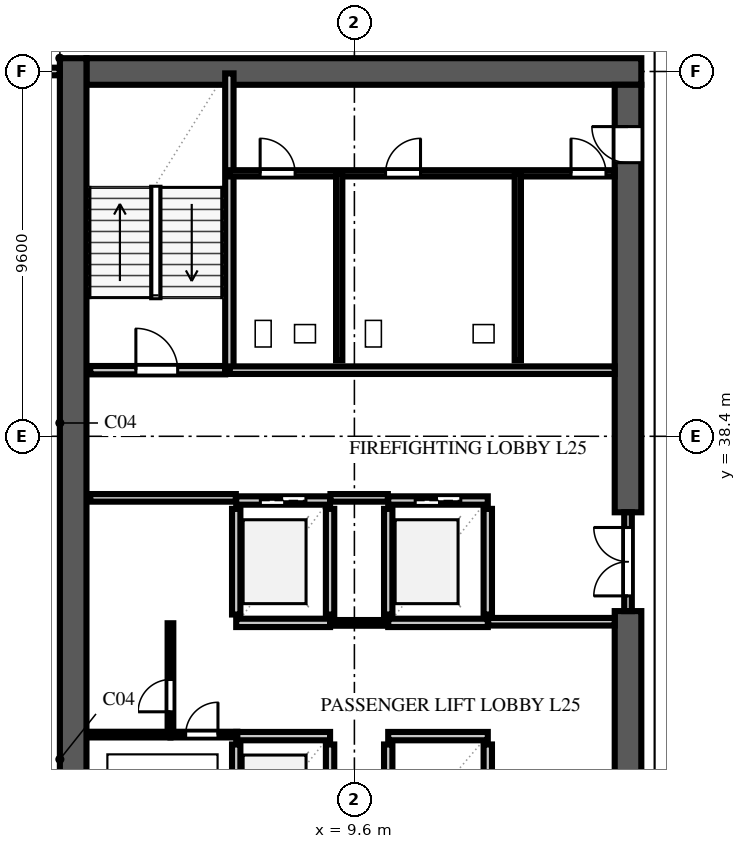
"""IFC4 building model, lengths in metres.
Left out: names, types, materials, properties, quantities, classifications, styles, units other than length and angle.
Written with IfcOpenShell. Run it as: python <this file> out.ifc"""

import sys

from ifc_helpers import new_model, si_unit, direction, frame, frame_2d, origin, place, context, subcontext, project, spatial, rectangle, extrude, element, fill, save


model = new_model("IFC4")
c1 = context("Model", 3, precision=1e-05, world=origin(), true_north=direction((0.0, 1.0)))
c2 = subcontext(c1, "Body", "Model", "MODEL_VIEW")
j1 = project(units=[si_unit("LENGTHUNIT", "METRE"), si_unit("PLANEANGLEUNIT", "RADIAN")], contexts=[c1])
p1 = place(None, origin())
s1 = spatial("IfcSite", under=j1, at=p1, CompositionType="ELEMENT")
p2 = place(p1, origin())
s2 = spatial("IfcBuilding", under=s1, at=p2, CompositionType="ELEMENT")
p3 = place(p2, frame((0.0, 0.0, 101.4)))
s3 = spatial("IfcBuildingStorey", under=s2, at=p3, CompositionType="ELEMENT", Elevation=101.4)
p4 = place(p3, frame((2.55, 48.0, 0.0), z_axis=(0.0, 0.0, 1.0), x_axis=(1.0, 0.0, 0.0)))
e1 = element("IfcWall", 1, at=p4, inside=s3, PredefinedType="SHEAR", context=c2, shape_type="SweptSolid", body=[
    extrude(rectangle(XDim=14.6, YDim=0.7, at=frame_2d((7.3, 0.0))), origin(), (0.0, 0.0, 1.0), 3.54),
])
p5 = place(p3, frame((2.2, 9.25, 0.0), z_axis=(0.0, 0.0, 1.0), x_axis=(0.0, 1.0, 0.0)))
e2 = element("IfcWall", 2, at=p5, inside=s3, PredefinedType="SHEAR", context=c2, shape_type="SweptSolid", body=[
    extrude(rectangle(XDim=39.1, YDim=0.7, at=frame_2d((19.55, 0.0))), origin(), (0.0, 0.0, 1.0), 3.54),
])
p6 = place(p3, frame((16.8, 26.0, 0.0), z_axis=(0.0, 0.0, 1.0), x_axis=(0.0, 1.0, 0.0)))
e3 = element("IfcWall", 3, at=p6, inside=s3, PredefinedType="SHEAR", context=c2, shape_type="SweptSolid", body=[
    extrude(rectangle(XDim=7.8, YDim=0.7, at=frame_2d((3.9, 0.0))), origin(), (0.0, 0.0, 1.0), 3.54),
])
p7 = place(p3, frame((16.8, 36.4, 0.0), z_axis=(0.0, 0.0, 1.0), x_axis=(0.0, 1.0, 0.0)))
e4 = element("IfcWall", 4, at=p7, inside=s3, PredefinedType="SHEAR", context=c2, shape_type="SweptSolid", body=[
    extrude(rectangle(XDim=11.25, YDim=0.7, at=frame_2d((5.625, 0.0))), origin(), (0.0, 0.0, 1.0), 3.54),
])
p8 = place(p7, frame((9.2, 0.0, 0.0)))
e5 = element("IfcOpeningElement", 5, at=p8, cuts=e4, PredefinedType="OPENING", context=c2, shape_type="SweptSolid", body=[
    extrude(rectangle(XDim=0.95, YDim=2.15, at=frame_2d((0.475, 1.075))), frame((0.0, 0.362, 0.0), z_axis=(0.0, -1.0, 0.0), x_axis=(1.0, 0.0, 0.0)), (0.0, 0.0, 1.0), 0.724),
])
p9 = place(p3, frame((2.65, 40.14, 0.0), z_axis=(0.0, 0.0, 1.0), x_axis=(1.0, 0.0, 0.0)))
e6 = element("IfcWall", 6, at=p9, inside=s3, PredefinedType="SOLIDWALL", context=c2, shape_type="SweptSolid", body=[
    extrude(rectangle(XDim=3.55, YDim=0.22, at=frame_2d((1.775, 0.0))), origin(), (0.0, 0.0, 1.0), 3.54),
])
p10 = place(p9, frame((1.2, 0.0, 0.0)))
e7 = element("IfcOpeningElement", 7, at=p10, cuts=e6, PredefinedType="OPENING", context=c2, shape_type="SweptSolid", body=[
    extrude(rectangle(XDim=1.1, YDim=2.2, at=frame_2d((0.55, 1.1))), frame((0.0, 0.122, 0.0), z_axis=(0.0, -1.0, 0.0), x_axis=(1.0, 0.0, 0.0)), (0.0, 0.0, 1.0), 0.244),
])
p11 = place(p3, frame((6.31, 40.14, 0.0), z_axis=(0.0, 0.0, 1.0), x_axis=(0.0, 1.0, 0.0)))
e8 = element("IfcWall", 8, at=p11, inside=s3, PredefinedType="SOLIDWALL", context=c2, shape_type="SweptSolid", body=[
    extrude(rectangle(XDim=7.81, YDim=0.22, at=frame_2d((3.905, 0.0))), origin(), (0.0, 0.0, 1.0), 3.54),
])
p12 = place(p3, frame((6.49, 27.71, 0.0), z_axis=(0.0, 0.0, 1.0), x_axis=(0.0, 1.0, 0.0)))
e9 = element("IfcWall", 9, at=p12, inside=s3, PredefinedType="SOLIDWALL", context=c2, shape_type="SweptSolid", body=[
    extrude(rectangle(XDim=2.58, YDim=0.22, at=frame_2d((1.29, 0.0))), origin(), (0.0, 0.0, 1.0), 3.54),
])
p13 = place(p3, frame((8.96, 27.71, 0.0), z_axis=(0.0, 0.0, 1.0), x_axis=(0.0, 1.0, 0.0)))
e10 = element("IfcWall", 10, at=p13, inside=s3, PredefinedType="SOLIDWALL", context=c2, shape_type="SweptSolid", body=[
    extrude(rectangle(XDim=2.58, YDim=0.22, at=frame_2d((1.29, 0.0))), origin(), (0.0, 0.0, 1.0), 3.54),
])
p14 = place(p13, frame((0.74, 0.0, 0.0)))
e11 = element("IfcOpeningElement", 11, at=p14, cuts=e10, PredefinedType="OPENING", context=c2, shape_type="SweptSolid", body=[
    extrude(rectangle(XDim=1.1, YDim=2.2, at=frame_2d((0.55, 1.1))), frame((0.0, 0.122, 0.0), z_axis=(0.0, -1.0, 0.0), x_axis=(1.0, 0.0, 0.0)), (0.0, 0.0, 1.0), 0.244),
])
p15 = place(p3, frame((6.49, 30.51, 0.0), z_axis=(0.0, 0.0, 1.0), x_axis=(1.0, 0.0, 0.0)))
e12 = element("IfcWall", 12, at=p15, inside=s3, PredefinedType="SOLIDWALL", context=c2, shape_type="SweptSolid", body=[
    extrude(rectangle(XDim=2.47, YDim=0.22, at=frame_2d((1.235, 0.0))), origin(), (0.0, 0.0, 1.0), 3.54),
])
for number, where, z_axis, x_axis in (
    (13, (10.49, 27.71, 0.0), (0.0, 0.0, 1.0), (0.0, 1.0, 0.0)),
    (14, (13.11, 27.71, 0.0), (0.0, 0.0, 1.0), (0.0, 1.0, 0.0)),
):
    element("IfcWall", number, at=place(p3, frame(where, z_axis=z_axis, x_axis=x_axis)), inside=s3, PredefinedType="SOLIDWALL", context=c2, shape_type="SweptSolid", body=[
        extrude(rectangle(XDim=2.58, YDim=0.22, at=frame_2d((1.29, 0.0))), origin(), (0.0, 0.0, 1.0), 3.54),
    ])
p16 = place(p3, frame((10.49, 30.51, 0.0), z_axis=(0.0, 0.0, 1.0), x_axis=(1.0, 0.0, 0.0)))
e15 = element("IfcWall", 15, at=p16, inside=s3, PredefinedType="SOLIDWALL", context=c2, shape_type="SweptSolid", body=[
    extrude(rectangle(XDim=2.62, YDim=0.22, at=frame_2d((1.31, 0.0))), origin(), (0.0, 0.0, 1.0), 3.54),
])
for number, where, z_axis, x_axis in (
    (16, (6.49, 33.71, 0.0), (0.0, 0.0, 1.0), (0.0, 1.0, 0.0)),
    (17, (8.96, 33.71, 0.0), (0.0, 0.0, 1.0), (0.0, 1.0, 0.0)),
):
    element("IfcWall", number, at=place(p3, frame(where, z_axis=z_axis, x_axis=x_axis)), inside=s3, PredefinedType="SOLIDWALL", context=c2, shape_type="SweptSolid", body=[
        extrude(rectangle(XDim=2.78, YDim=0.22, at=frame_2d((1.39, 0.0))), origin(), (0.0, 0.0, 1.0), 3.54),
    ])
p17 = place(p3, frame((6.49, 33.49, 0.0), z_axis=(0.0, 0.0, 1.0), x_axis=(1.0, 0.0, 0.0)))
e18 = element("IfcWall", 18, at=p17, inside=s3, PredefinedType="SOLIDWALL", context=c2, shape_type="SweptSolid", body=[
    extrude(rectangle(XDim=2.47, YDim=0.22, at=frame_2d((1.235, 0.0))), origin(), (0.0, 0.0, 1.0), 3.54),
])
p18 = place(p3, frame((6.49, 36.71, 0.0), z_axis=(0.0, 0.0, 1.0), x_axis=(1.0, 0.0, 0.0)))
e19 = element("IfcWall", 19, at=p18, inside=s3, PredefinedType="SOLIDWALL", context=c2, shape_type="SweptSolid", body=[
    extrude(rectangle(XDim=2.47, YDim=0.22, at=frame_2d((1.235, 0.0))), origin(), (0.0, 0.0, 1.0), 3.54),
])
p19 = place(p18, frame((0.635, 0.0, 0.0)))
e20 = element("IfcOpeningElement", 20, at=p19, cuts=e19, PredefinedType="OPENING", context=c2, shape_type="SweptSolid", body=[
    extrude(rectangle(XDim=1.2, YDim=2.2, at=frame_2d((0.6, 1.1))), frame((0.0, 0.122, 0.0), z_axis=(0.0, -1.0, 0.0), x_axis=(1.0, 0.0, 0.0)), (0.0, 0.0, 1.0), 0.244),
])
for number, where, z_axis, x_axis in (
    (21, (10.49, 33.71, 0.0), (0.0, 0.0, 1.0), (0.0, 1.0, 0.0)),
    (22, (13.11, 33.71, 0.0), (0.0, 0.0, 1.0), (0.0, 1.0, 0.0)),
):
    element("IfcWall", number, at=place(p3, frame(where, z_axis=z_axis, x_axis=x_axis)), inside=s3, PredefinedType="SOLIDWALL", context=c2, shape_type="SweptSolid", body=[
        extrude(rectangle(XDim=2.78, YDim=0.22, at=frame_2d((1.39, 0.0))), origin(), (0.0, 0.0, 1.0), 3.54),
    ])
p20 = place(p3, frame((10.49, 33.49, 0.0), z_axis=(0.0, 0.0, 1.0), x_axis=(1.0, 0.0, 0.0)))
e23 = element("IfcWall", 23, at=p20, inside=s3, PredefinedType="SOLIDWALL", context=c2, shape_type="SweptSolid", body=[
    extrude(rectangle(XDim=2.62, YDim=0.22, at=frame_2d((1.31, 0.0))), origin(), (0.0, 0.0, 1.0), 3.54),
])
p21 = place(p3, frame((10.49, 36.71, 0.0), z_axis=(0.0, 0.0, 1.0), x_axis=(1.0, 0.0, 0.0)))
e24 = element("IfcWall", 24, at=p21, inside=s3, PredefinedType="SOLIDWALL", context=c2, shape_type="SweptSolid", body=[
    extrude(rectangle(XDim=2.62, YDim=0.22, at=frame_2d((1.31, 0.0))), origin(), (0.0, 0.0, 1.0), 3.54),
])
p22 = place(p21, frame((0.71, 0.0, 0.0)))
e25 = element("IfcOpeningElement", 25, at=p22, cuts=e24, PredefinedType="OPENING", context=c2, shape_type="SweptSolid", body=[
    extrude(rectangle(XDim=1.2, YDim=2.2, at=frame_2d((0.6, 1.1))), frame((0.0, 0.122, 0.0), z_axis=(0.0, -1.0, 0.0), x_axis=(1.0, 0.0, 0.0)), (0.0, 0.0, 1.0), 0.244),
])
p23 = place(p3, frame((2.65, 36.78, 0.0), z_axis=(0.0, 0.0, 1.0), x_axis=(1.0, 0.0, 0.0)))
e26 = element("IfcWall", 26, at=p23, inside=s3, PredefinedType="SOLIDWALL", context=c2, shape_type="SweptSolid", body=[
    extrude(rectangle(XDim=3.83, YDim=0.2, at=frame_2d((1.915, 0.0))), origin(), (0.0, 0.0, 1.0), 3.54),
])
p24 = place(p3, frame((8.97, 36.78, 0.0), z_axis=(0.0, 0.0, 1.0), x_axis=(1.0, 0.0, 0.0)))
e27 = element("IfcWall", 27, at=p24, inside=s3, PredefinedType="SOLIDWALL", context=c2, shape_type="SweptSolid", body=[
    extrude(rectangle(XDim=1.51, YDim=0.2, at=frame_2d((0.755, 0.0))), origin(), (0.0, 0.0, 1.0), 3.54),
])
p25 = place(p3, frame((13.12, 33.52, 0.0), z_axis=(0.0, 0.0, 1.0), x_axis=(1.0, 0.0, 0.0)))
e28 = element("IfcWall", 28, at=p25, inside=s3, PredefinedType="SOLIDWALL", context=c2, shape_type="SweptSolid", body=[
    extrude(rectangle(XDim=3.33, YDim=0.2, at=frame_2d((1.665, 0.0))), origin(), (0.0, 0.0, 1.0), 3.54),
])
p26 = place(p3, frame((6.32, 40.14, 0.0), z_axis=(0.0, 0.0, 1.0), x_axis=(1.0, 0.0, 0.0)))
e29 = element("IfcWall", 29, at=p26, inside=s3, PredefinedType="SOLIDWALL", context=c2, shape_type="SweptSolid", body=[
    extrude(rectangle(XDim=10.13, YDim=0.2, at=frame_2d((5.065, 0.0))), origin(), (0.0, 0.0, 1.0), 3.54),
])
p27 = place(p3, frame((16.8, 33.8, 0.0), z_axis=(0.0, 0.0, 1.0), x_axis=(0.0, 1.0, 0.0)))
e30 = element("IfcWall", 30, at=p27, inside=s3, PredefinedType="SOLIDWALL", context=c2, shape_type="SweptSolid", body=[
    extrude(rectangle(XDim=2.6, YDim=0.2, at=frame_2d((1.3, 0.0))), origin(), (0.0, 0.0, 1.0), 3.54),
])
p28 = place(p27, frame((0.4, 0.0, 0.0)))
e31 = element("IfcOpeningElement", 31, at=p28, cuts=e30, PredefinedType="OPENING", context=c2, shape_type="SweptSolid", body=[
    extrude(rectangle(XDim=1.8, YDim=2.2, at=frame_2d((0.9, 1.1))), frame((0.0, 0.112, 0.0), z_axis=(0.0, -1.0, 0.0), x_axis=(1.0, 0.0, 0.0)), (0.0, 0.0, 1.0), 0.224),
])
p29 = place(p3, frame((8.965, 33.49, 0.0), z_axis=(0.0, 0.0, 1.0), x_axis=(1.0, 0.0, 0.0)))
e32 = element("IfcWall", 32, at=p29, inside=s3, PredefinedType="PARTITIONING", context=c2, shape_type="SweptSolid", body=[
    extrude(rectangle(XDim=1.52, YDim=0.15, at=frame_2d((0.76, 0.0))), origin(), (0.0, 0.0, 1.0), 3.54),
])
p30 = place(p3, frame((4.76, 30.55, 0.0), z_axis=(0.0, 0.0, 1.0), x_axis=(0.0, 1.0, 0.0)))
e33 = element("IfcWall", 33, at=p30, inside=s3, PredefinedType="PARTITIONING", context=c2, shape_type="SweptSolid", body=[
    extrude(rectangle(XDim=2.93, YDim=0.15, at=frame_2d((1.465, 0.0))), origin(), (0.0, 0.0, 1.0), 3.54),
])
p31 = place(p30, frame((0.6, 0.0, 0.0)))
e34 = element("IfcOpeningElement", 34, at=p31, cuts=e33, PredefinedType="OPENING", context=c2, shape_type="SweptSolid", body=[
    extrude(rectangle(XDim=0.85, YDim=2.1, at=frame_2d((0.425, 1.05))), frame((0.0, 0.087, 0.0), z_axis=(0.0, -1.0, 0.0), x_axis=(1.0, 0.0, 0.0)), (0.0, 0.0, 1.0), 0.174),
])
p32 = place(p3, frame((4.76, 30.55, 0.0), z_axis=(0.0, 0.0, 1.0), x_axis=(1.0, 0.0, 0.0)))
e35 = element("IfcWall", 35, at=p32, inside=s3, PredefinedType="PARTITIONING", context=c2, shape_type="SweptSolid", body=[
    extrude(rectangle(XDim=1.76, YDim=0.15, at=frame_2d((0.88, 0.0))), origin(), (0.0, 0.0, 1.0), 3.54),
])
p33 = place(p32, frame((0.4, 0.0, 0.0)))
e36 = element("IfcOpeningElement", 36, at=p33, cuts=e35, PredefinedType="OPENING", context=c2, shape_type="SweptSolid", body=[
    extrude(rectangle(XDim=0.85, YDim=2.1, at=frame_2d((0.425, 1.05))), frame((0.0, 0.087, 0.0), z_axis=(0.0, -1.0, 0.0), x_axis=(1.0, 0.0, 0.0)), (0.0, 0.0, 1.0), 0.174),
])
p34 = place(p3, frame((2.65, 30.55, 0.0), z_axis=(0.0, 0.0, 1.0), x_axis=(1.0, 0.0, 0.0)))
e37 = element("IfcWall", 37, at=p34, inside=s3, PredefinedType="PARTITIONING", context=c2, shape_type="SweptSolid", body=[
    extrude(rectangle(XDim=2.11, YDim=0.15, at=frame_2d((1.055, 0.0))), origin(), (0.0, 0.0, 1.0), 3.54),
])
p35 = place(p3, frame((6.32, 45.32, 0.0), z_axis=(0.0, 0.0, 1.0), x_axis=(1.0, 0.0, 0.0)))
e38 = element("IfcWall", 38, at=p35, inside=s3, PredefinedType="PLUMBINGWALL", context=c2, shape_type="SweptSolid", body=[
    extrude(rectangle(XDim=10.13, YDim=0.165, at=frame_2d((5.065, 0.0))), origin(), (0.0, 0.0, 1.0), 3.54),
])
p36 = place(p35, frame((0.8, 0.0, 0.0)))
e39 = element("IfcOpeningElement", 39, at=p36, cuts=e38, PredefinedType="OPENING", context=c2, shape_type="SweptSolid", body=[
    extrude(rectangle(XDim=0.92, YDim=2.15, at=frame_2d((0.46, 1.075))), frame((0.0, 0.094, 0.0), z_axis=(0.0, -1.0, 0.0), x_axis=(1.0, 0.0, 0.0)), (0.0, 0.0, 1.0), 0.189),
])
p37 = place(p35, frame((4.1, 0.0, 0.0)))
e40 = element("IfcOpeningElement", 40, at=p37, cuts=e38, PredefinedType="OPENING", context=c2, shape_type="SweptSolid", body=[
    extrude(rectangle(XDim=0.92, YDim=2.15, at=frame_2d((0.46, 1.075))), frame((0.0, 0.094, 0.0), z_axis=(0.0, -1.0, 0.0), x_axis=(1.0, 0.0, 0.0)), (0.0, 0.0, 1.0), 0.189),
])
p38 = place(p35, frame((8.98, 0.0, 0.0)))
e41 = element("IfcOpeningElement", 41, at=p38, cuts=e38, PredefinedType="OPENING", context=c2, shape_type="SweptSolid", body=[
    extrude(rectangle(XDim=0.92, YDim=2.15, at=frame_2d((0.46, 1.075))), frame((0.0, 0.094, 0.0), z_axis=(0.0, -1.0, 0.0), x_axis=(1.0, 0.0, 0.0)), (0.0, 0.0, 1.0), 0.189),
])
for number, where, z_axis, x_axis in (
    (42, (9.2, 40.4, 0.0), (0.0, 0.0, 1.0), (0.0, 1.0, 0.0)),
    (43, (13.9, 40.4, 0.0), (0.0, 0.0, 1.0), (0.0, 1.0, 0.0)),
):
    element("IfcWall", number, at=place(p3, frame(where, z_axis=z_axis, x_axis=x_axis)), inside=s3, PredefinedType="PLUMBINGWALL", context=c2, shape_type="SweptSolid", body=[
        extrude(rectangle(XDim=4.92, YDim=0.165, at=frame_2d((2.46, 0.0))), origin(), (0.0, 0.0, 1.0), 3.54),
    ])
p39 = place(p3, frame((0.85, 48.0, 0.0), z_axis=(0.0, 0.0, 1.0), x_axis=(1.0, 0.0, 0.0)))
e44 = element("IfcWall", 44, at=p39, inside=s3, PredefinedType="SOLIDWALL", context=c2, shape_type="SweptSolid", body=[
    extrude(rectangle(XDim=0.995, YDim=0.2, at=frame_2d((0.498, 0.0))), origin(), (0.0, 0.0, 1.0), 3.54),
])
p40 = place(p10, origin())
e45 = element("IfcDoor", 45, at=p40, inside=s3, OperationType="SINGLE_SWING_LEFT", PredefinedType="DOOR", context=c2, shape_type="SweptSolid", body=[
    extrude(rectangle(XDim=1.1, YDim=2.2, at=frame_2d((0.55, 1.1))), frame((0.0, 0.025, 0.0), z_axis=(0.0, -1.0, 0.0), x_axis=(1.0, 0.0, 0.0)), (0.0, 0.0, 1.0), 0.05),
])
fill(e7, e45)
p41 = place(p19, origin())
e46 = element("IfcDoor", 46, at=p41, inside=s3, OperationType="DOUBLE_DOOR_SLIDING", PredefinedType="DOOR", context=c2, shape_type="SweptSolid", body=[
    extrude(rectangle(XDim=1.2, YDim=2.2, at=frame_2d((0.6, 1.1))), frame((0.0, 0.025, 0.0), z_axis=(0.0, -1.0, 0.0), x_axis=(1.0, 0.0, 0.0)), (0.0, 0.0, 1.0), 0.05),
])
fill(e20, e46)
p42 = place(p22, origin())
e47 = element("IfcDoor", 47, at=p42, inside=s3, OperationType="DOUBLE_DOOR_SLIDING", PredefinedType="DOOR", context=c2, shape_type="SweptSolid", body=[
    extrude(rectangle(XDim=1.2, YDim=2.2, at=frame_2d((0.6, 1.1))), frame((0.0, 0.025, 0.0), z_axis=(0.0, -1.0, 0.0), x_axis=(1.0, 0.0, 0.0)), (0.0, 0.0, 1.0), 0.05),
])
fill(e25, e47)
p43 = place(p8, origin())
e48 = element("IfcDoor", 48, at=p43, inside=s3, OperationType="SINGLE_SWING_RIGHT", PredefinedType="DOOR", context=c2, shape_type="SweptSolid", body=[
    extrude(rectangle(XDim=0.95, YDim=2.15, at=frame_2d((0.475, 1.075))), frame((0.0, 0.025, 0.0), z_axis=(0.0, -1.0, 0.0), x_axis=(1.0, 0.0, 0.0)), (0.0, 0.0, 1.0), 0.05),
])
fill(e5, e48)
p44 = place(p28, origin())
e49 = element("IfcDoor", 49, at=p44, inside=s3, OperationType="DOUBLE_DOOR_SINGLE_SWING", PredefinedType="DOOR", context=c2, shape_type="SweptSolid", body=[
    extrude(rectangle(XDim=1.8, YDim=2.2, at=frame_2d((0.9, 1.1))), frame((0.0, 0.025, 0.0), z_axis=(0.0, -1.0, 0.0), x_axis=(1.0, 0.0, 0.0)), (0.0, 0.0, 1.0), 0.05),
])
fill(e31, e49)
p45 = place(p31, origin())
e50 = element("IfcDoor", 50, at=p45, inside=s3, OperationType="SINGLE_SWING_LEFT", PredefinedType="DOOR", context=c2, shape_type="SweptSolid", body=[
    extrude(rectangle(XDim=0.85, YDim=2.1, at=frame_2d((0.425, 1.05))), frame((0.0, 0.025, 0.0), z_axis=(0.0, -1.0, 0.0), x_axis=(1.0, 0.0, 0.0)), (0.0, 0.0, 1.0), 0.05),
])
fill(e34, e50)
p46 = place(p33, origin())
e51 = element("IfcDoor", 51, at=p46, inside=s3, OperationType="SINGLE_SWING_RIGHT", PredefinedType="DOOR", context=c2, shape_type="SweptSolid", body=[
    extrude(rectangle(XDim=0.85, YDim=2.1, at=frame_2d((0.425, 1.05))), frame((0.0, 0.025, 0.0), z_axis=(0.0, -1.0, 0.0), x_axis=(1.0, 0.0, 0.0)), (0.0, 0.0, 1.0), 0.05),
])
fill(e36, e51)
p47 = place(p36, origin())
e52 = element("IfcDoor", 52, at=p47, inside=s3, OperationType="SINGLE_SWING_LEFT", PredefinedType="DOOR", context=c2, shape_type="SweptSolid", body=[
    extrude(rectangle(XDim=0.92, YDim=2.15, at=frame_2d((0.46, 1.075))), frame((0.0, 0.025, 0.0), z_axis=(0.0, -1.0, 0.0), x_axis=(1.0, 0.0, 0.0)), (0.0, 0.0, 1.0), 0.05),
])
fill(e39, e52)
p48 = place(p37, origin())
e53 = element("IfcDoor", 53, at=p48, inside=s3, OperationType="SINGLE_SWING_RIGHT", PredefinedType="DOOR", context=c2, shape_type="SweptSolid", body=[
    extrude(rectangle(XDim=0.92, YDim=2.15, at=frame_2d((0.46, 1.075))), frame((0.0, 0.025, 0.0), z_axis=(0.0, -1.0, 0.0), x_axis=(1.0, 0.0, 0.0)), (0.0, 0.0, 1.0), 0.05),
])
fill(e40, e53)
p49 = place(p38, origin())
e54 = element("IfcDoor", 54, at=p49, inside=s3, OperationType="SINGLE_SWING_LEFT", PredefinedType="DOOR", context=c2, shape_type="SweptSolid", body=[
    extrude(rectangle(XDim=0.92, YDim=2.15, at=frame_2d((0.46, 1.075))), frame((0.0, 0.025, 0.0), z_axis=(0.0, -1.0, 0.0), x_axis=(1.0, 0.0, 0.0)), (0.0, 0.0, 1.0), 0.05),
])
fill(e41, e54)
save(model, sys.argv[1])
